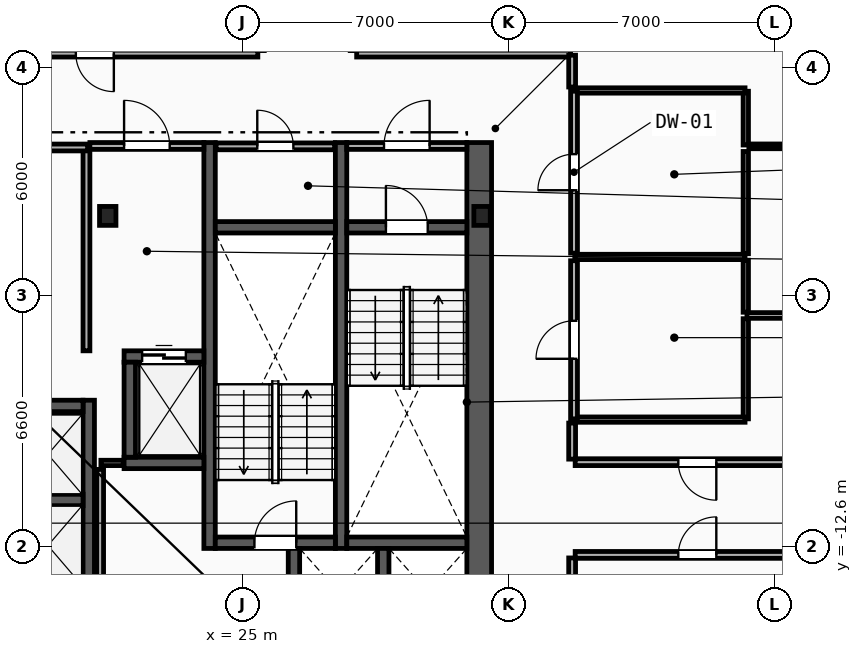
"""IFC4 building model, lengths in metres.
Left out: names, types, materials, properties, quantities, classifications, styles, units other than length and angle.
Written with IfcOpenShell. Run it as: python <this file> out.ifc"""

import sys

from ifc_helpers import new_model, si_unit, direction, frame, frame_2d, origin, origin_2d, place, context, subcontext, project, spatial, rectangle, i_section, extrude, element, fill, save


model = new_model("IFC4")
c1 = context("Model", 3, precision=1e-05, world=origin(), true_north=direction((0.0, 1.0)))
c2 = subcontext(c1, "Body", "Model", "MODEL_VIEW")
j1 = project(units=[si_unit("LENGTHUNIT", "METRE"), si_unit("PLANEANGLEUNIT", "RADIAN")], contexts=[c1])
p1 = place(None, origin())
s1 = spatial("IfcSite", under=j1, at=p1, CompositionType="ELEMENT")
p2 = place(p1, origin())
s2 = spatial("IfcBuilding", under=s1, at=p2, CompositionType="ELEMENT")
p3 = place(p2, frame((0.0, 0.0, 151.2)))
s3 = spatial("IfcBuildingStorey", under=s2, at=p3, CompositionType="ELEMENT", Elevation=151.2)
for number, where, z_axis, x_axis in (
    (1, (31.3, -3.9, 0.0), (0.0, 0.0, 1.0), (1.0, 0.0, 0.0)),
    (2, (21.45, -3.9, 0.0), (0.0, 0.0, 1.0), (1.0, 0.0, 0.0)),
):
    element("IfcColumn", number, at=place(p3, frame(where, z_axis=z_axis, x_axis=x_axis)), inside=s3, PredefinedType="COLUMN", context=c2, shape_type="SweptSolid", body=[
        extrude(i_section(OverallWidth=0.432, OverallDepth=0.498, WebThickness=0.056, FlangeThickness=0.089, FilletRadius=0.018, at=origin_2d()), origin(), (0.0, 0.0, 1.0), 3.6),
    ])
p4 = place(p3, frame((31.225, -15.3, 0.0), z_axis=(0.0, 0.0, 1.0), x_axis=(0.0, 1.0, 0.0)))
e3 = element("IfcWall", 3, at=p4, inside=s3, PredefinedType="SHEAR", context=c2, shape_type="SweptSolid", body=[
    extrude(rectangle(XDim=13.33, YDim=0.65, at=frame_2d((6.665, 0.0))), origin(), (0.0, 0.0, 1.0), 3.36),
])
for number, where, z_axis, x_axis in (
    (4, (27.59, -12.65, 0.0), (0.0, 0.0, 1.0), (0.0, 1.0, 0.0)),
    (5, (24.13, -12.65, 0.0), (0.0, 0.0, 1.0), (0.0, 1.0, 0.0)),
):
    element("IfcWall", number, at=place(p3, frame(where, z_axis=z_axis, x_axis=x_axis)), inside=s3, PredefinedType="SHEAR", context=c2, shape_type="SweptSolid", body=[
        extrude(rectangle(XDim=10.68, YDim=0.3, at=frame_2d((5.34, 0.0))), origin(), (0.0, 0.0, 1.0), 3.36),
    ])
p5 = place(p3, frame((27.74, -4.2, 0.0), z_axis=(0.0, 0.0, 1.0), x_axis=(1.0, 0.0, 0.0)))
e6 = element("IfcWall", 6, at=p5, inside=s3, PredefinedType="SHEAR", context=c2, shape_type="SweptSolid", body=[
    extrude(rectangle(XDim=3.16, YDim=0.3, at=frame_2d((1.58, 0.0))), origin(), (0.0, 0.0, 1.0), 3.36),
])
p6 = place(p5, frame((1.03, 0.0, 0.0)))
e7 = element("IfcOpeningElement", 7, at=p6, cuts=e6, PredefinedType="OPENING", context=c2, shape_type="SweptSolid", body=[
    extrude(rectangle(XDim=1.1, YDim=2.15, at=frame_2d((0.55, 1.075))), frame((0.0, 0.16, 0.0), z_axis=(0.0, -1.0, 0.0), x_axis=(1.0, 0.0, 0.0)), (0.0, 0.0, 1.0), 0.32),
])
p7 = place(p3, frame((27.74, -12.5, 0.0), z_axis=(0.0, 0.0, 1.0), x_axis=(1.0, 0.0, 0.0)))
e8 = element("IfcWall", 8, at=p7, inside=s3, PredefinedType="SHEAR", context=c2, shape_type="SweptSolid", body=[
    extrude(rectangle(XDim=3.16, YDim=0.3, at=frame_2d((1.58, 0.0))), origin(), (0.0, 0.0, 1.0), 3.36),
])
p8 = place(p3, frame((24.28, -12.5, 0.0), z_axis=(0.0, 0.0, 1.0), x_axis=(1.0, 0.0, 0.0)))
e9 = element("IfcWall", 9, at=p8, inside=s3, PredefinedType="SHEAR", context=c2, shape_type="SweptSolid", body=[
    extrude(rectangle(XDim=3.16, YDim=0.3, at=frame_2d((1.58, 0.0))), origin(), (0.0, 0.0, 1.0), 3.36),
])
p9 = place(p8, frame((1.03, 0.0, 0.0)))
e10 = element("IfcOpeningElement", 10, at=p9, cuts=e9, PredefinedType="OPENING", context=c2, shape_type="SweptSolid", body=[
    extrude(rectangle(XDim=1.1, YDim=2.15, at=frame_2d((0.55, 1.075))), frame((0.0, 0.16, 0.0), z_axis=(0.0, -1.0, 0.0), x_axis=(1.0, 0.0, 0.0)), (0.0, 0.0, 1.0), 0.32),
])
p10 = place(p3, frame((24.28, -4.2, 0.0), z_axis=(0.0, 0.0, 1.0), x_axis=(1.0, 0.0, 0.0)))
e11 = element("IfcWall", 11, at=p10, inside=s3, PredefinedType="SHEAR", context=c2, shape_type="SweptSolid", body=[
    extrude(rectangle(XDim=3.16, YDim=0.3, at=frame_2d((1.58, 0.0))), origin(), (0.0, 0.0, 1.0), 3.36),
])
p11 = place(p3, frame((20.89, -7.45, 0.0), z_axis=(0.0, 0.0, 1.0), x_axis=(0.0, 1.0, 0.0)))
e12 = element("IfcWall", 12, at=p11, inside=s3, PredefinedType="PARTITIONING", context=c2, shape_type="SweptSolid", body=[
    extrude(rectangle(XDim=5.3, YDim=0.18, at=frame_2d((2.65, 0.0))), origin(), (0.0, 0.0, 1.0), 3.36),
])
p12 = place(p3, frame((20.98, -2.06, 0.0), z_axis=(0.0, 0.0, 1.0), x_axis=(1.0, 0.0, 0.0)))
e13 = element("IfcWall", 13, at=p12, inside=s3, PredefinedType="PARTITIONING", context=c2, shape_type="SweptSolid", body=[
    extrude(rectangle(XDim=3.0, YDim=0.18, at=frame_2d((1.5, 0.0))), origin(), (0.0, 0.0, 1.0), 3.36),
])
p13 = place(p12, frame((0.9, 0.0, 0.0)))
e14 = element("IfcOpeningElement", 14, at=p13, cuts=e13, PredefinedType="OPENING", context=c2, shape_type="SweptSolid", body=[
    extrude(rectangle(XDim=1.2, YDim=2.15, at=frame_2d((0.6, 1.075))), frame((0.0, 0.1, 0.0), z_axis=(0.0, -1.0, 0.0), x_axis=(1.0, 0.0, 0.0)), (0.0, 0.0, 1.0), 0.2),
])
p14 = place(p3, frame((27.74, -2.06, 0.0), z_axis=(0.0, 0.0, 1.0), x_axis=(1.0, 0.0, 0.0)))
e15 = element("IfcWall", 15, at=p14, inside=s3, PredefinedType="PARTITIONING", context=c2, shape_type="SweptSolid", body=[
    extrude(rectangle(XDim=3.16, YDim=0.18, at=frame_2d((1.58, 0.0))), origin(), (0.0, 0.0, 1.0), 3.36),
])
p15 = place(p14, frame((0.98, 0.0, 0.0)))
e16 = element("IfcOpeningElement", 16, at=p15, cuts=e15, PredefinedType="OPENING", context=c2, shape_type="SweptSolid", body=[
    extrude(rectangle(XDim=1.2, YDim=2.15, at=frame_2d((0.6, 1.075))), frame((0.0, 0.1, 0.0), z_axis=(0.0, -1.0, 0.0), x_axis=(1.0, 0.0, 0.0)), (0.0, 0.0, 1.0), 0.2),
])
p16 = place(p3, frame((21.88, -7.6, 0.0), z_axis=(0.0, 0.0, 1.0), x_axis=(1.0, 0.0, 0.0)))
e17 = element("IfcWall", 17, at=p16, inside=s3, PredefinedType="SHEAR", context=c2, shape_type="SweptSolid", body=[
    extrude(rectangle(XDim=2.1, YDim=0.3, at=frame_2d((1.05, 0.0))), origin(), (0.0, 0.0, 1.0), 3.36),
])
p17 = place(p16, frame((0.475, 0.0, 0.0)))
e18 = element("IfcOpeningElement", 18, at=p17, cuts=e17, PredefinedType="OPENING", context=c2, shape_type="SweptSolid", body=[
    extrude(rectangle(XDim=1.15, YDim=2.2, at=frame_2d((0.575, 1.1))), frame((0.0, 0.16, 0.0), z_axis=(0.0, -1.0, 0.0), x_axis=(1.0, 0.0, 0.0)), (0.0, 0.0, 1.0), 0.32),
])
p18 = place(p3, frame((21.88, -10.4, 0.0), z_axis=(0.0, 0.0, 1.0), x_axis=(1.0, 0.0, 0.0)))
e19 = element("IfcWall", 19, at=p18, inside=s3, PredefinedType="SHEAR", context=c2, shape_type="SweptSolid", body=[
    extrude(rectangle(XDim=2.1, YDim=0.3, at=frame_2d((1.05, 0.0))), origin(), (0.0, 0.0, 1.0), 3.36),
])
p19 = place(p3, frame((22.03, -10.25, 0.0), z_axis=(0.0, 0.0, 1.0), x_axis=(0.0, 1.0, 0.0)))
e20 = element("IfcWall", 20, at=p19, inside=s3, PredefinedType="SHEAR", context=c2, shape_type="SweptSolid", body=[
    extrude(rectangle(XDim=2.5, YDim=0.3, at=frame_2d((1.25, 0.0))), origin(), (0.0, 0.0, 1.0), 3.36),
])
for number, where, z_axis, x_axis in (
    (21, (28.7, -14.95, 0.0), (0.0, 0.0, 1.0), (0.0, 1.0, 0.0)),
    (22, (26.35, -14.95, 0.0), (0.0, 0.0, 1.0), (0.0, 1.0, 0.0)),
):
    element("IfcWall", number, at=place(p3, frame(where, z_axis=z_axis, x_axis=x_axis)), inside=s3, PredefinedType="SHEAR", context=c2, shape_type="SweptSolid", body=[
        extrude(rectangle(XDim=2.3, YDim=0.3, at=frame_2d((1.15, 0.0))), origin(), (0.0, 0.0, 1.0), 3.36),
    ])
p20 = place(p3, frame((20.95, -14.0, 0.0), z_axis=(0.0, 0.0, 1.0), x_axis=(0.0, 1.0, 0.0)))
e23 = element("IfcWall", 23, at=p20, inside=s3, PredefinedType="SHEAR", context=c2, shape_type="SweptSolid", body=[
    extrude(rectangle(XDim=5.25, YDim=0.3, at=frame_2d((2.625, 0.0))), origin(), (0.0, 0.0, 1.0), 3.36),
])
p21 = place(p3, frame((18.65, -8.9, 0.0), z_axis=(0.0, 0.0, 1.0), x_axis=(1.0, 0.0, 0.0)))
e24 = element("IfcWall", 24, at=p21, inside=s3, PredefinedType="SHEAR", context=c2, shape_type="SweptSolid", body=[
    extrude(rectangle(XDim=2.15, YDim=0.3, at=frame_2d((1.075, 0.0))), origin(), (0.0, 0.0, 1.0), 3.36),
])
p22 = place(p3, frame((18.95, -11.375, 0.0), z_axis=(0.0, 0.0, 1.0), x_axis=(1.0, 0.0, 0.0)))
e25 = element("IfcWall", 25, at=p22, inside=s3, PredefinedType="SHEAR", context=c2, shape_type="SweptSolid", body=[
    extrude(rectangle(XDim=1.85, YDim=0.3, at=frame_2d((0.925, 0.0))), origin(), (0.0, 0.0, 1.0), 3.36),
])
p23 = place(p3, frame((21.27, -10.4, 0.0), z_axis=(0.0, 0.0, 1.0), x_axis=(1.0, 0.0, 0.0)))
e26 = element("IfcWall", 26, at=p23, inside=s3, PredefinedType="PARTITIONING", context=c2, shape_type="SweptSolid", body=[
    extrude(rectangle(XDim=0.59, YDim=0.14, at=frame_2d((0.295, 0.0))), origin(), (0.0, 0.0, 1.0), 3.36),
])
p24 = place(p3, frame((21.25, -14.93, 0.0), z_axis=(0.0, 0.0, 1.0), x_axis=(0.0, 1.0, 0.0)))
e27 = element("IfcWall", 27, at=p24, inside=s3, PredefinedType="PARTITIONING", context=c2, shape_type="SweptSolid", body=[
    extrude(rectangle(XDim=4.36, YDim=0.18, at=frame_2d((2.18, 0.0))), origin(), (0.0, 0.0, 1.0), 3.36),
])
p25 = place(p3, frame((24.3, -2.07, 0.0), z_axis=(0.0, 0.0, 1.0), x_axis=(1.0, 0.0, 0.0)))
e28 = element("IfcWall", 28, at=p25, inside=s3, PredefinedType="PARTITIONING", context=c2, shape_type="SweptSolid", body=[
    extrude(rectangle(XDim=3.12, YDim=0.18, at=frame_2d((1.56, 0.0))), origin(), (0.0, 0.0, 1.0), 3.36),
])
p26 = place(p25, frame((1.085, 0.0, 0.0)))
e29 = element("IfcOpeningElement", 29, at=p26, cuts=e28, PredefinedType="OPENING", context=c2, shape_type="SweptSolid", body=[
    extrude(rectangle(XDim=0.95, YDim=2.1, at=frame_2d((0.475, 1.05))), frame((0.0, 0.1, 0.0), z_axis=(0.0, -1.0, 0.0), x_axis=(1.0, 0.0, 0.0)), (0.0, 0.0, 1.0), 0.2),
])
p27 = place(p3, frame((38.24, -9.24, 0.0), z_axis=(0.0, 0.0, 1.0), x_axis=(0.0, 1.0, 0.0)))
e30 = element("IfcWall", 30, at=p27, inside=s3, PredefinedType="PARTITIONING", context=c2, shape_type="SweptSolid", body=[
    extrude(rectangle(XDim=2.635, YDim=0.14, at=frame_2d((1.317, 0.0))), origin(), (0.0, 0.0, 1.0), 3.36),
])
p28 = place(p3, frame((38.24, -6.435, 0.0), z_axis=(0.0, 0.0, 1.0), x_axis=(0.0, 1.0, 0.0)))
e31 = element("IfcWall", 31, at=p28, inside=s3, PredefinedType="PARTITIONING", context=c2, shape_type="SweptSolid", body=[
    extrude(rectangle(XDim=1.37, YDim=0.14, at=frame_2d((0.685, 0.0))), origin(), (0.0, 0.0, 1.0), 3.36),
])
p29 = place(p3, frame((38.24, -4.895, 0.0), z_axis=(0.0, 0.0, 1.0), x_axis=(0.0, 1.0, 0.0)))
e32 = element("IfcWall", 32, at=p29, inside=s3, PredefinedType="PARTITIONING", context=c2, shape_type="SweptSolid", body=[
    extrude(rectangle(XDim=2.69, YDim=0.14, at=frame_2d((1.345, 0.0))), origin(), (0.0, 0.0, 1.0), 3.36),
])
p30 = place(p3, frame((38.24, -2.035, 0.0), z_axis=(0.0, 0.0, 1.0), x_axis=(0.0, 1.0, 0.0)))
e33 = element("IfcWall", 33, at=p30, inside=s3, PredefinedType="PARTITIONING", context=c2, shape_type="SweptSolid", body=[
    extrude(rectangle(XDim=1.415, YDim=0.14, at=frame_2d((0.708, 0.0))), origin(), (0.0, 0.0, 1.0), 3.36),
])
for number, where, z_axis, x_axis in (
    (34, (33.74, -0.6, 0.0), (0.0, 0.0, 1.0), (1.0, 0.0, 0.0)),
    (35, (33.74, -4.98, 0.0), (0.0, 0.0, 1.0), (1.0, 0.0, 0.0)),
    (36, (33.74, -9.26, 0.0), (0.0, 0.0, 1.0), (1.0, 0.0, 0.0)),
):
    element("IfcWall", number, at=place(p3, frame(where, z_axis=z_axis, x_axis=x_axis)), inside=s3, PredefinedType="PARTITIONING", context=c2, shape_type="SweptSolid", body=[
        extrude(rectangle(XDim=4.48, YDim=0.14, at=frame_2d((2.24, 0.0))), origin(), (0.0, 0.0, 1.0), 3.36),
    ])
p31 = place(p3, frame((33.72, -4.88, 0.0), z_axis=(0.0, 0.0, 1.0), x_axis=(0.0, 1.0, 0.0)))
e37 = element("IfcWall", 37, at=p31, inside=s3, PredefinedType="PARTITIONING", context=c2, shape_type="SweptSolid", body=[
    extrude(rectangle(XDim=4.26, YDim=0.18, at=frame_2d((2.13, 0.0))), origin(), (0.0, 0.0, 1.0), 3.36),
])
p32 = place(p31, frame((1.655, 0.0, 0.0)))
e38 = element("IfcOpeningElement", 38, at=p32, cuts=e37, PredefinedType="OPENING", context=c2, shape_type="SweptSolid", body=[
    extrude(rectangle(XDim=0.95, YDim=2.1, at=frame_2d((0.475, 1.05))), frame((0.0, 0.1, 0.0), z_axis=(0.0, -1.0, 0.0), x_axis=(1.0, 0.0, 0.0)), (0.0, 0.0, 1.0), 0.2),
])
p33 = place(p3, frame((33.72, -9.24, 0.0), z_axis=(0.0, 0.0, 1.0), x_axis=(0.0, 1.0, 0.0)))
e39 = element("IfcWall", 39, at=p33, inside=s3, PredefinedType="PARTITIONING", context=c2, shape_type="SweptSolid", body=[
    extrude(rectangle(XDim=4.16, YDim=0.18, at=frame_2d((2.08, 0.0))), origin(), (0.0, 0.0, 1.0), 3.36),
])
p34 = place(p33, frame((1.58, 0.0, 0.0)))
e40 = element("IfcOpeningElement", 40, at=p34, cuts=e39, PredefinedType="OPENING", context=c2, shape_type="SweptSolid", body=[
    extrude(rectangle(XDim=1.0, YDim=2.15, at=frame_2d((0.5, 1.075))), frame((0.0, 0.1, 0.0), z_axis=(0.0, -1.0, 0.0), x_axis=(1.0, 0.0, 0.0)), (0.0, 0.0, 1.0), 0.2),
])
p35 = place(p3, frame((38.27, -6.52, 0.0), z_axis=(0.0, 0.0, 1.0), x_axis=(1.0, 0.0, 0.0)))
e41 = element("IfcWall", 41, at=p35, inside=s3, PredefinedType="PARTITIONING", context=c2, shape_type="SweptSolid", body=[
    extrude(rectangle(XDim=12.307, YDim=0.15, at=frame_2d((6.154, 0.0))), origin(), (0.0, 0.0, 1.0), 3.36),
])
p36 = place(p3, frame((33.75, -12.82, 0.0), z_axis=(0.0, 0.0, 1.0), x_axis=(1.0, 0.0, 0.0)))
e42 = element("IfcWall", 42, at=p36, inside=s3, PredefinedType="PARTITIONING", context=c2, shape_type="SweptSolid", body=[
    extrude(rectangle(XDim=6.428, YDim=0.18, at=frame_2d((3.214, 0.0))), origin(), (0.0, 0.0, 1.0), 3.36),
])
p37 = place(p36, frame((2.714, 0.0, 0.0)))
e43 = element("IfcOpeningElement", 43, at=p37, cuts=e42, PredefinedType="OPENING", context=c2, shape_type="SweptSolid", body=[
    extrude(rectangle(XDim=1.0, YDim=2.15, at=frame_2d((0.5, 1.075))), frame((0.0, 0.1, 0.0), z_axis=(0.0, -1.0, 0.0), x_axis=(1.0, 0.0, 0.0)), (0.0, 0.0, 1.0), 0.2),
])
p38 = place(p3, frame((33.67, -14.63, 0.0), z_axis=(0.0, 0.0, 1.0), x_axis=(0.0, 1.0, 0.0)))
e44 = element("IfcWall", 44, at=p38, inside=s3, PredefinedType="PARTITIONING", context=c2, shape_type="SweptSolid", body=[
    extrude(rectangle(XDim=1.73, YDim=0.18, at=frame_2d((0.865, 0.0))), origin(), (0.0, 0.0, 1.0), 3.36),
])
p39 = place(p3, frame((40.178, -10.38, 0.0), z_axis=(0.0, 0.0, 1.0), x_axis=(-1.0, 0.0, 0.0)))
e45 = element("IfcWall", 45, at=p39, inside=s3, PredefinedType="PARTITIONING", context=c2, shape_type="SweptSolid", body=[
    extrude(rectangle(XDim=6.428, YDim=0.18, at=frame_2d((3.214, 0.0))), origin(), (0.0, 0.0, 1.0), 3.36),
])
p40 = place(p39, frame((2.714, 0.0, 0.0)))
e46 = element("IfcOpeningElement", 46, at=p40, cuts=e45, PredefinedType="OPENING", context=c2, shape_type="SweptSolid", body=[
    extrude(rectangle(XDim=1.0, YDim=2.15, at=frame_2d((0.5, 1.075))), frame((0.0, 0.1, 0.0), z_axis=(0.0, -1.0, 0.0), x_axis=(1.0, 0.0, 0.0)), (0.0, 0.0, 1.0), 0.2),
])
p41 = place(p3, frame((33.67, -10.3, 0.0), z_axis=(0.0, 0.0, 1.0), x_axis=(0.0, 1.0, 0.0)))
e47 = element("IfcWall", 47, at=p41, inside=s3, PredefinedType="PARTITIONING", context=c2, shape_type="SweptSolid", body=[
    extrude(rectangle(XDim=0.949, YDim=0.18, at=frame_2d((0.474, 0.0))), origin(), (0.0, 0.0, 1.0), 3.36),
])
p42 = place(p3, frame((25.4, 0.37, 0.0), z_axis=(0.0, 0.0, 1.0), x_axis=(-1.0, 0.0, 0.0)))
e48 = element("IfcWall", 48, at=p42, inside=s3, PredefinedType="PARTITIONING", context=c2, shape_type="SweptSolid", body=[
    extrude(rectangle(XDim=8.578, YDim=0.18, at=frame_2d((4.289, 0.0))), origin(), (0.0, 0.0, 1.0), 3.36),
])
p43 = place(p42, frame((3.789, 0.0, 0.0)))
e49 = element("IfcOpeningElement", 49, at=p43, cuts=e48, PredefinedType="OPENING", context=c2, shape_type="SweptSolid", body=[
    extrude(rectangle(XDim=1.0, YDim=2.15, at=frame_2d((0.5, 1.075))), frame((0.0, 0.1, 0.0), z_axis=(0.0, -1.0, 0.0), x_axis=(1.0, 0.0, 0.0)), (0.0, 0.0, 1.0), 0.2),
])
p44 = place(p3, frame((16.822, -2.1, 0.0), z_axis=(0.0, 0.0, 1.0), x_axis=(1.0, 0.0, 0.0)))
e50 = element("IfcWall", 50, at=p44, inside=s3, PredefinedType="PARTITIONING", context=c2, shape_type="SweptSolid", body=[
    extrude(rectangle(XDim=4.098, YDim=0.18, at=frame_2d((2.049, 0.0))), origin(), (0.0, 0.0, 1.0), 3.36),
])
p45 = place(p3, frame((33.628, 0.37, 0.0), z_axis=(0.0, 0.0, 1.0), x_axis=(-1.0, 0.0, 0.0)))
e51 = element("IfcWall", 51, at=p45, inside=s3, PredefinedType="PARTITIONING", context=c2, shape_type="SweptSolid", body=[
    extrude(rectangle(XDim=5.628, YDim=0.18, at=frame_2d((2.814, 0.0))), origin(), (0.0, 0.0, 1.0), 3.36),
])
p46 = place(p3, frame((33.67, -0.509, 0.0), z_axis=(0.0, 0.0, 1.0), x_axis=(0.0, 1.0, 0.0)))
e52 = element("IfcWall", 52, at=p46, inside=s3, PredefinedType="PARTITIONING", context=c2, shape_type="SweptSolid", body=[
    extrude(rectangle(XDim=0.837, YDim=0.18, at=frame_2d((0.418, 0.0))), origin(), (0.0, 0.0, 1.0), 3.36),
])
p47 = place(p3, frame((38.32, -2.07, 0.0), z_axis=(0.0, 0.0, 1.0), x_axis=(1.0, 0.0, 0.0)))
e53 = element("IfcWall", 53, at=p47, inside=s3, PredefinedType="PARTITIONING", context=c2, shape_type="SweptSolid", body=[
    extrude(rectangle(XDim=12.702, YDim=0.125, at=frame_2d((6.351, 0.0))), origin(), (0.0, 0.0, 1.0), 3.36),
])
p48 = place(p47, frame((5.851, 0.0, 0.0)))
e54 = element("IfcOpeningElement", 54, at=p48, cuts=e53, PredefinedType="OPENING", context=c2, shape_type="SweptSolid", body=[
    extrude(rectangle(XDim=1.0, YDim=2.15, at=frame_2d((0.5, 1.075))), frame((0.0, 0.073, 0.0), z_axis=(0.0, -1.0, 0.0), x_axis=(1.0, 0.0, 0.0)), (0.0, 0.0, 1.0), 0.145),
])
p49 = place(p6, origin())
e55 = element("IfcDoor", 55, at=p49, inside=s3, OperationType="SINGLE_SWING_LEFT", PredefinedType="DOOR", context=c2, shape_type="SweptSolid", body=[
    extrude(rectangle(XDim=1.1, YDim=2.15, at=frame_2d((0.55, 1.075))), frame((0.0, 0.025, 0.0), z_axis=(0.0, -1.0, 0.0), x_axis=(1.0, 0.0, 0.0)), (0.0, 0.0, 1.0), 0.05),
])
fill(e7, e55)
p50 = place(p9, origin())
e56 = element("IfcDoor", 56, at=p50, inside=s3, OperationType="SINGLE_SWING_RIGHT", PredefinedType="DOOR", context=c2, shape_type="SweptSolid", body=[
    extrude(rectangle(XDim=1.1, YDim=2.15, at=frame_2d((0.55, 1.075))), frame((0.0, 0.025, 0.0), z_axis=(0.0, -1.0, 0.0), x_axis=(1.0, 0.0, 0.0)), (0.0, 0.0, 1.0), 0.05),
])
fill(e10, e56)
p51 = place(p13, origin())
e57 = element("IfcDoor", 57, at=p51, inside=s3, OperationType="SINGLE_SWING_LEFT", PredefinedType="DOOR", context=c2, shape_type="SweptSolid", body=[
    extrude(rectangle(XDim=1.2, YDim=2.15, at=frame_2d((0.6, 1.075))), frame((0.0, 0.025, 0.0), z_axis=(0.0, -1.0, 0.0), x_axis=(1.0, 0.0, 0.0)), (0.0, 0.0, 1.0), 0.05),
])
fill(e14, e57)
p52 = place(p15, origin())
e58 = element("IfcDoor", 58, at=p52, inside=s3, OperationType="SINGLE_SWING_RIGHT", PredefinedType="DOOR", context=c2, shape_type="SweptSolid", body=[
    extrude(rectangle(XDim=1.2, YDim=2.15, at=frame_2d((0.6, 1.075))), frame((0.0, 0.025, 0.0), z_axis=(0.0, -1.0, 0.0), x_axis=(1.0, 0.0, 0.0)), (0.0, 0.0, 1.0), 0.05),
])
fill(e16, e58)
p53 = place(p17, origin())
e59 = element("IfcDoor", 59, at=p53, inside=s3, OperationType="SLIDING_TO_LEFT", PredefinedType="TRAPDOOR", context=c2, shape_type="SweptSolid", body=[
    extrude(rectangle(XDim=1.15, YDim=2.2, at=frame_2d((0.575, 1.1))), frame((0.0, 0.025, 0.0), z_axis=(0.0, -1.0, 0.0), x_axis=(1.0, 0.0, 0.0)), (0.0, 0.0, 1.0), 0.05),
])
fill(e18, e59)
p54 = place(p43, origin())
e60 = element("IfcDoor", 60, at=p54, inside=s3, OperationType="SINGLE_SWING_LEFT", PredefinedType="DOOR", context=c2, shape_type="SweptSolid", body=[
    extrude(rectangle(XDim=1.0, YDim=2.15, at=frame_2d((0.5, 1.075))), frame((0.0, 0.025, 0.0), z_axis=(0.0, -1.0, 0.0), x_axis=(1.0, 0.0, 0.0)), (0.0, 0.0, 1.0), 0.05),
])
fill(e49, e60)
p55 = place(p37, origin())
e61 = element("IfcDoor", 61, at=p55, inside=s3, OperationType="SINGLE_SWING_RIGHT", PredefinedType="DOOR", context=c2, shape_type="SweptSolid", body=[
    extrude(rectangle(XDim=1.0, YDim=2.15, at=frame_2d((0.5, 1.075))), frame((0.0, 0.025, 0.0), z_axis=(0.0, -1.0, 0.0), x_axis=(1.0, 0.0, 0.0)), (0.0, 0.0, 1.0), 0.05),
])
fill(e43, e61)
p56 = place(p40, origin())
e62 = element("IfcDoor", 62, at=p56, inside=s3, OperationType="SINGLE_SWING_LEFT", PredefinedType="DOOR", context=c2, shape_type="SweptSolid", body=[
    extrude(rectangle(XDim=1.0, YDim=2.15, at=frame_2d((0.5, 1.075))), frame((0.0, 0.025, 0.0), z_axis=(0.0, -1.0, 0.0), x_axis=(1.0, 0.0, 0.0)), (0.0, 0.0, 1.0), 0.05),
])
fill(e46, e62)
p57 = place(p32, origin())
e63 = element("IfcDoor", 63, at=p57, inside=s3, OperationType="SINGLE_SWING_LEFT", PredefinedType="DOOR", context=c2, shape_type="SweptSolid", body=[
    extrude(rectangle(XDim=0.95, YDim=2.1, at=frame_2d((0.475, 1.05))), frame((0.0, 0.025, 0.0), z_axis=(0.0, -1.0, 0.0), x_axis=(1.0, 0.0, 0.0)), (0.0, 0.0, 1.0), 0.05),
])
fill(e38, e63)
p58 = place(p34, origin())
e64 = element("IfcDoor", 64, at=p58, inside=s3, OperationType="SINGLE_SWING_LEFT", PredefinedType="DOOR", context=c2, shape_type="SweptSolid", body=[
    extrude(rectangle(XDim=1.0, YDim=2.15, at=frame_2d((0.5, 1.075))), frame((0.0, 0.025, 0.0), z_axis=(0.0, -1.0, 0.0), x_axis=(1.0, 0.0, 0.0)), (0.0, 0.0, 1.0), 0.05),
])
fill(e40, e64)
p59 = place(p26, origin())
e65 = element("IfcDoor", 65, at=p59, inside=s3, OperationType="SINGLE_SWING_LEFT", PredefinedType="DOOR", context=c2, shape_type="SweptSolid", body=[
    extrude(rectangle(XDim=0.95, YDim=2.1, at=frame_2d((0.475, 1.05))), frame((0.0, 0.025, 0.0), z_axis=(0.0, -1.0, 0.0), x_axis=(1.0, 0.0, 0.0)), (0.0, 0.0, 1.0), 0.05),
])
fill(e29, e65)
save(model, sys.argv[1])
